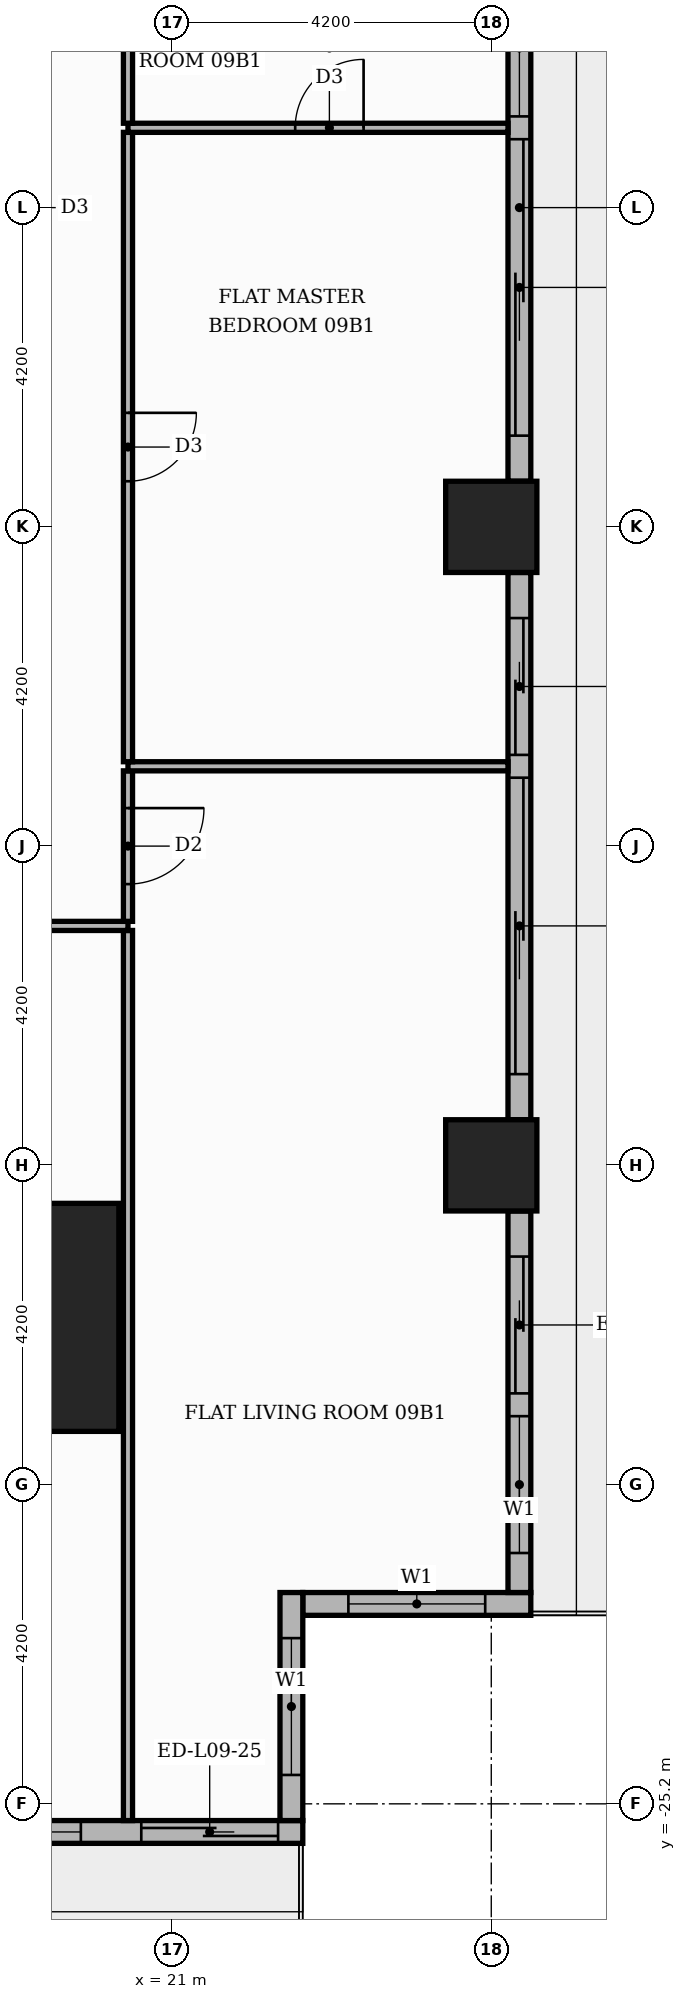
"""IFC4 building model, lengths in metres.
Left out: names, types, materials, properties, quantities, classifications, styles, units other than length and angle.
Written with IfcOpenShell. Run it as: python <this file> out.ifc"""

import sys

from ifc_helpers import new_model, si_unit, direction, frame, frame_2d, origin, origin_2d, place, context, subcontext, project, spatial, rectangle, extrude, element, fill, save


model = new_model("IFC4")
c1 = context("Model", 3, precision=1e-05, world=origin(), true_north=direction((0.0, 1.0)))
c2 = subcontext(c1, "Body", "Model", "MODEL_VIEW")
j1 = project(units=[si_unit("LENGTHUNIT", "METRE"), si_unit("PLANEANGLEUNIT", "RADIAN")], contexts=[c1])
p1 = place(None, origin())
s1 = spatial("IfcSite", under=j1, at=p1, CompositionType="ELEMENT")
p2 = place(p1, origin())
s2 = spatial("IfcBuilding", under=s1, at=p2, CompositionType="ELEMENT")
p3 = place(p2, frame((0.0, 0.0, 42.6)))
s3 = spatial("IfcBuildingStorey", under=s2, at=p3, CompositionType="ELEMENT", Elevation=42.6)
p4 = place(p3, frame((18.8, -18.8, 0.0), z_axis=(0.0, 0.0, 1.0), x_axis=(1.0, 0.0, 0.0)))
e1 = element("IfcColumn", 1, at=p4, inside=s3, PredefinedType="COLUMN", context=c2, shape_type="SweptSolid", body=[
    extrude(rectangle(XDim=3.0, YDim=3.0, at=origin_2d()), origin(), (0.0, 0.0, 1.0), 3.9),
])
for number, where, z_axis, x_axis in (
    (2, (25.2, -8.4, 0.0), (0.0, 0.0, 1.0), (1.0, 0.0, 0.0)),
    (3, (25.2, -16.8, 0.0), (0.0, 0.0, 1.0), (1.0, 0.0, 0.0)),
):
    element("IfcColumn", number, at=place(p3, frame(where, z_axis=z_axis, x_axis=x_axis)), inside=s3, PredefinedType="COLUMN", context=c2, shape_type="SweptSolid", body=[
        extrude(rectangle(XDim=1.2, YDim=1.2, at=origin_2d()), origin(), (0.0, 0.0, 1.0), 3.9),
    ])
p5 = place(p3, frame((22.72, -22.57, 0.0), z_axis=(0.0, 0.0, 1.0), x_axis=(1.0, 0.0, 0.0)))
e4 = element("IfcWall", 4, at=p5, inside=s3, PredefinedType="STANDARD", context=c2, shape_type="SweptSolid", body=[
    extrude(rectangle(XDim=3.0, YDim=0.3, at=frame_2d((1.5, 0.0))), origin(), (0.0, 0.0, 1.0), 3.48),
])
p6 = place(p5, frame((0.6, 0.0, 0.9)))
e5 = element("IfcOpeningElement", 5, at=p6, cuts=e4, PredefinedType="OPENING", context=c2, shape_type="SweptSolid", body=[
    extrude(rectangle(XDim=1.8, YDim=2.1, at=frame_2d((0.9, 1.05))), frame((0.0, 0.16, 0.0), z_axis=(0.0, -1.0, 0.0), x_axis=(1.0, 0.0, 0.0)), (0.0, 0.0, 1.0), 0.32),
])
p7 = place(p3, frame((25.57, -22.42, 0.0), z_axis=(0.0, 0.0, 1.0), x_axis=(0.0, 1.0, 0.0)))
e6 = element("IfcWall", 6, at=p7, inside=s3, PredefinedType="STANDARD", context=c2, shape_type="SweptSolid", body=[
    extrude(rectangle(XDim=5.02, YDim=0.3, at=frame_2d((2.51, 0.0))), origin(), (0.0, 0.0, 1.0), 3.48),
])
p8 = place(p7, frame((0.52, 0.0, 0.9)))
e7 = element("IfcOpeningElement", 7, at=p8, cuts=e6, PredefinedType="OPENING", context=c2, shape_type="SweptSolid", body=[
    extrude(rectangle(XDim=1.8, YDim=2.1, at=frame_2d((0.9, 1.05))), frame((0.0, 0.16, 0.0), z_axis=(0.0, -1.0, 0.0), x_axis=(1.0, 0.0, 0.0)), (0.0, 0.0, 1.0), 0.32),
])
p9 = place(p7, frame((2.62, 0.0, 0.0)))
e8 = element("IfcOpeningElement", 8, at=p9, cuts=e6, PredefinedType="OPENING", context=c2, shape_type="SweptSolid", body=[
    extrude(rectangle(XDim=1.8, YDim=2.4, at=frame_2d((0.9, 1.2))), frame((0.0, 0.16, 0.0), z_axis=(0.0, -1.0, 0.0), x_axis=(1.0, 0.0, 0.0)), (0.0, 0.0, 1.0), 0.32),
])
p10 = place(p3, frame((25.57, -16.2, 0.0), z_axis=(0.0, 0.0, 1.0), x_axis=(0.0, 1.0, 0.0)))
e9 = element("IfcWall", 9, at=p10, inside=s3, PredefinedType="STANDARD", context=c2, shape_type="SweptSolid", body=[
    extrude(rectangle(XDim=7.2, YDim=0.3, at=frame_2d((3.6, 0.0))), origin(), (0.0, 0.0, 1.0), 3.48),
])
p11 = place(p10, frame((0.6, 0.0, 0.0)))
e10 = element("IfcOpeningElement", 10, at=p11, cuts=e9, PredefinedType="OPENING", context=c2, shape_type="SweptSolid", body=[
    extrude(rectangle(XDim=3.9, YDim=2.4, at=frame_2d((1.95, 1.2))), frame((0.0, 0.16, 0.0), z_axis=(0.0, -1.0, 0.0), x_axis=(1.0, 0.0, 0.0)), (0.0, 0.0, 1.0), 0.32),
])
p12 = place(p10, frame((4.8, 0.0, 0.0)))
e11 = element("IfcOpeningElement", 11, at=p12, cuts=e9, PredefinedType="OPENING", context=c2, shape_type="SweptSolid", body=[
    extrude(rectangle(XDim=1.8, YDim=2.4, at=frame_2d((0.9, 1.2))), frame((0.0, 0.16, 0.0), z_axis=(0.0, -1.0, 0.0), x_axis=(1.0, 0.0, 0.0)), (0.0, 0.0, 1.0), 0.32),
])
p13 = place(p3, frame((25.57, -7.8, 0.0), z_axis=(0.0, 0.0, 1.0), x_axis=(0.0, 1.0, 0.0)))
e12 = element("IfcWall", 12, at=p13, inside=s3, PredefinedType="STANDARD", context=c2, shape_type="SweptSolid", body=[
    extrude(rectangle(XDim=7.2, YDim=0.3, at=frame_2d((3.6, 0.0))), origin(), (0.0, 0.0, 1.0), 3.48),
])
p14 = place(p13, frame((0.6, 0.0, 0.0)))
e13 = element("IfcOpeningElement", 13, at=p14, cuts=e12, PredefinedType="OPENING", context=c2, shape_type="SweptSolid", body=[
    extrude(rectangle(XDim=3.9, YDim=2.4, at=frame_2d((1.95, 1.2))), frame((0.0, 0.16, 0.0), z_axis=(0.0, -1.0, 0.0), x_axis=(1.0, 0.0, 0.0)), (0.0, 0.0, 1.0), 0.32),
])
p15 = place(p13, frame((4.8, 0.0, 0.9)))
e14 = element("IfcOpeningElement", 14, at=p15, cuts=e12, PredefinedType="OPENING", context=c2, shape_type="SweptSolid", body=[
    extrude(rectangle(XDim=1.8, YDim=2.1, at=frame_2d((0.9, 1.05))), frame((0.0, 0.16, 0.0), z_axis=(0.0, -1.0, 0.0), x_axis=(1.0, 0.0, 0.0)), (0.0, 0.0, 1.0), 0.32),
])
p16 = place(p3, frame((17.4, -25.57, 0.0), z_axis=(0.0, 0.0, 1.0), x_axis=(1.0, 0.0, 0.0)))
e15 = element("IfcWall", 15, at=p16, inside=s3, PredefinedType="STANDARD", context=c2, shape_type="SweptSolid", body=[
    extrude(rectangle(XDim=5.32, YDim=0.3, at=frame_2d((2.66, 0.0))), origin(), (0.0, 0.0, 1.0), 3.48),
])
p17 = place(p16, frame((0.6, 0.0, 0.9)))
e16 = element("IfcOpeningElement", 16, at=p17, cuts=e15, PredefinedType="OPENING", context=c2, shape_type="SweptSolid", body=[
    extrude(rectangle(XDim=1.8, YDim=2.1, at=frame_2d((0.9, 1.05))), frame((0.0, 0.16, 0.0), z_axis=(0.0, -1.0, 0.0), x_axis=(1.0, 0.0, 0.0)), (0.0, 0.0, 1.0), 0.32),
])
p18 = place(p16, frame((3.195, 0.0, 0.0)))
e17 = element("IfcOpeningElement", 17, at=p18, cuts=e15, PredefinedType="OPENING", context=c2, shape_type="SweptSolid", body=[
    extrude(rectangle(XDim=1.8, YDim=2.4, at=frame_2d((0.9, 1.2))), frame((0.0, 0.16, 0.0), z_axis=(0.0, -1.0, 0.0), x_axis=(1.0, 0.0, 0.0)), (0.0, 0.0, 1.0), 0.32),
])
p19 = place(p3, frame((22.57, -25.42, 0.0), z_axis=(0.0, 0.0, 1.0), x_axis=(0.0, 1.0, 0.0)))
e18 = element("IfcWall", 18, at=p19, inside=s3, PredefinedType="STANDARD", context=c2, shape_type="SweptSolid", body=[
    extrude(rectangle(XDim=3.0, YDim=0.3, at=frame_2d((1.5, 0.0))), origin(), (0.0, 0.0, 1.0), 3.48),
])
p20 = place(p19, frame((0.6, 0.0, 0.9)))
e19 = element("IfcOpeningElement", 19, at=p20, cuts=e18, PredefinedType="OPENING", context=c2, shape_type="SweptSolid", body=[
    extrude(rectangle(XDim=1.8, YDim=2.1, at=frame_2d((0.9, 1.05))), frame((0.0, 0.16, 0.0), z_axis=(0.0, -1.0, 0.0), x_axis=(1.0, 0.0, 0.0)), (0.0, 0.0, 1.0), 0.32),
])
p21 = place(p3, frame((20.42, -25.42, 0.0), z_axis=(0.0, 0.0, 1.0), x_axis=(0.0, 1.0, 0.0)))
e20 = element("IfcWall", 20, at=p21, inside=s3, PredefinedType="PARTITIONING", context=c2, shape_type="SweptSolid", body=[
    extrude(rectangle(XDim=11.71, YDim=0.12, at=frame_2d((5.855, 0.0))), origin(), (0.0, 0.0, 1.0), 3.48),
])
p22 = place(p3, frame((13.65, -13.65, 0.0), z_axis=(0.0, 0.0, 1.0), x_axis=(1.0, 0.0, 0.0)))
e21 = element("IfcWall", 21, at=p22, inside=s3, PredefinedType="PARTITIONING", context=c2, shape_type="SweptSolid", body=[
    extrude(rectangle(XDim=6.77, YDim=0.12, at=frame_2d((3.385, 0.0))), origin(), (0.0, 0.0, 1.0), 3.48),
])
p23 = place(p22, frame((2.885, 0.0, 0.0)))
e22 = element("IfcOpeningElement", 22, at=p23, cuts=e21, PredefinedType="OPENING", context=c2, shape_type="SweptSolid", body=[
    extrude(rectangle(XDim=1.0, YDim=2.1, at=frame_2d((0.5, 1.05))), frame((0.0, 0.07, 0.0), z_axis=(0.0, -1.0, 0.0), x_axis=(1.0, 0.0, 0.0)), (0.0, 0.0, 1.0), 0.14),
])
p24 = place(p3, frame((20.42, -13.59, 0.0), z_axis=(0.0, 0.0, 1.0), x_axis=(0.0, 1.0, 0.0)))
e23 = element("IfcWall", 23, at=p24, inside=s3, PredefinedType="PARTITIONING", context=c2, shape_type="SweptSolid", body=[
    extrude(rectangle(XDim=1.98, YDim=0.12, at=frame_2d((0.99, 0.0))), origin(), (0.0, 0.0, 1.0), 3.48),
])
p25 = place(p24, frame((0.49, 0.0, 0.0)))
e24 = element("IfcOpeningElement", 24, at=p25, cuts=e23, PredefinedType="OPENING", context=c2, shape_type="SweptSolid", body=[
    extrude(rectangle(XDim=1.0, YDim=2.1, at=frame_2d((0.5, 1.05))), frame((0.0, 0.07, 0.0), z_axis=(0.0, -1.0, 0.0), x_axis=(1.0, 0.0, 0.0)), (0.0, 0.0, 1.0), 0.14),
])
p26 = place(p3, frame((20.42, -11.55, 0.0), z_axis=(0.0, 0.0, 1.0), x_axis=(1.0, 0.0, 0.0)))
e25 = element("IfcWall", 25, at=p26, inside=s3, PredefinedType="PARTITIONING", context=c2, shape_type="SweptSolid", body=[
    extrude(rectangle(XDim=5.0, YDim=0.12, at=frame_2d((2.5, 0.0))), origin(), (0.0, 0.0, 1.0), 3.48),
])
p27 = place(p3, frame((20.42, -11.49, 0.0), z_axis=(0.0, 0.0, 1.0), x_axis=(0.0, 1.0, 0.0)))
e26 = element("IfcWall", 26, at=p27, inside=s3, PredefinedType="PARTITIONING", context=c2, shape_type="SweptSolid", body=[
    extrude(rectangle(XDim=8.28, YDim=0.12, at=frame_2d((4.14, 0.0))), origin(), (0.0, 0.0, 1.0), 3.48),
])
p28 = place(p27, frame((3.69, 0.0, 0.0)))
e27 = element("IfcOpeningElement", 27, at=p28, cuts=e26, PredefinedType="OPENING", context=c2, shape_type="SweptSolid", body=[
    extrude(rectangle(XDim=0.9, YDim=2.1, at=frame_2d((0.45, 1.05))), frame((0.0, 0.07, 0.0), z_axis=(0.0, -1.0, 0.0), x_axis=(1.0, 0.0, 0.0)), (0.0, 0.0, 1.0), 0.14),
])
p29 = place(p3, frame((20.42, -3.15, 0.0), z_axis=(0.0, 0.0, 1.0), x_axis=(1.0, 0.0, 0.0)))
e28 = element("IfcWall", 28, at=p29, inside=s3, PredefinedType="PARTITIONING", context=c2, shape_type="SweptSolid", body=[
    extrude(rectangle(XDim=5.0, YDim=0.12, at=frame_2d((2.5, 0.0))), origin(), (0.0, 0.0, 1.0), 3.48),
])
p30 = place(p29, frame((2.2, 0.0, 0.0)))
e29 = element("IfcOpeningElement", 29, at=p30, cuts=e28, PredefinedType="OPENING", context=c2, shape_type="SweptSolid", body=[
    extrude(rectangle(XDim=0.9, YDim=2.1, at=frame_2d((0.45, 1.05))), frame((0.0, 0.07, 0.0), z_axis=(0.0, -1.0, 0.0), x_axis=(1.0, 0.0, 0.0)), (0.0, 0.0, 1.0), 0.14),
])
p31 = place(p3, frame((20.42, -3.09, 0.0), z_axis=(0.0, 0.0, 1.0), x_axis=(0.0, 1.0, 0.0)))
e30 = element("IfcWall", 30, at=p31, inside=s3, PredefinedType="PARTITIONING", context=c2, shape_type="SweptSolid", body=[
    extrude(rectangle(XDim=1.98, YDim=0.12, at=frame_2d((0.99, 0.0))), origin(), (0.0, 0.0, 1.0), 3.48),
])
p32 = place(p6, origin())
e31 = element("IfcWindow", 31, at=p32, inside=s3, PartitioningType="SINGLE_PANEL", PredefinedType="WINDOW", context=c2, shape_type="SweptSolid", body=[
    extrude(rectangle(XDim=1.8, YDim=2.1, at=frame_2d((0.9, 1.05))), frame((0.0, 0.03, 0.0), z_axis=(0.0, -1.0, 0.0), x_axis=(1.0, 0.0, 0.0)), (0.0, 0.0, 1.0), 0.06),
])
fill(e5, e31)
p33 = place(p8, origin())
e32 = element("IfcWindow", 32, at=p33, inside=s3, PartitioningType="SINGLE_PANEL", PredefinedType="WINDOW", context=c2, shape_type="SweptSolid", body=[
    extrude(rectangle(XDim=1.8, YDim=2.1, at=frame_2d((0.9, 1.05))), frame((0.0, 0.03, 0.0), z_axis=(0.0, -1.0, 0.0), x_axis=(1.0, 0.0, 0.0)), (0.0, 0.0, 1.0), 0.06),
])
fill(e7, e32)
p34 = place(p9, origin())
e33 = element("IfcDoor", 33, at=p34, inside=s3, OperationType="SLIDING_TO_RIGHT", PredefinedType="DOOR", context=c2, shape_type="SweptSolid", body=[
    extrude(rectangle(XDim=1.8, YDim=2.4, at=frame_2d((0.9, 1.2))), frame((0.0, 0.025, 0.0), z_axis=(0.0, -1.0, 0.0), x_axis=(1.0, 0.0, 0.0)), (0.0, 0.0, 1.0), 0.05),
])
fill(e8, e33)
p35 = place(p11, origin())
e34 = element("IfcDoor", 34, at=p35, inside=s3, OperationType="SLIDING_TO_LEFT", PredefinedType="DOOR", context=c2, shape_type="SweptSolid", body=[
    extrude(rectangle(XDim=3.9, YDim=2.4, at=frame_2d((1.95, 1.2))), frame((0.0, 0.025, 0.0), z_axis=(0.0, -1.0, 0.0), x_axis=(1.0, 0.0, 0.0)), (0.0, 0.0, 1.0), 0.05),
])
fill(e10, e34)
p36 = place(p12, origin())
e35 = element("IfcDoor", 35, at=p36, inside=s3, OperationType="SLIDING_TO_RIGHT", PredefinedType="DOOR", context=c2, shape_type="SweptSolid", body=[
    extrude(rectangle(XDim=1.8, YDim=2.4, at=frame_2d((0.9, 1.2))), frame((0.0, 0.025, 0.0), z_axis=(0.0, -1.0, 0.0), x_axis=(1.0, 0.0, 0.0)), (0.0, 0.0, 1.0), 0.05),
])
fill(e11, e35)
p37 = place(p14, origin())
e36 = element("IfcDoor", 36, at=p37, inside=s3, OperationType="SLIDING_TO_LEFT", PredefinedType="DOOR", context=c2, shape_type="SweptSolid", body=[
    extrude(rectangle(XDim=3.9, YDim=2.4, at=frame_2d((1.95, 1.2))), frame((0.0, 0.025, 0.0), z_axis=(0.0, -1.0, 0.0), x_axis=(1.0, 0.0, 0.0)), (0.0, 0.0, 1.0), 0.05),
])
fill(e13, e36)
p38 = place(p15, origin())
e37 = element("IfcWindow", 37, at=p38, inside=s3, PartitioningType="SINGLE_PANEL", PredefinedType="WINDOW", context=c2, shape_type="SweptSolid", body=[
    extrude(rectangle(XDim=1.8, YDim=2.1, at=frame_2d((0.9, 1.05))), frame((0.0, 0.03, 0.0), z_axis=(0.0, -1.0, 0.0), x_axis=(1.0, 0.0, 0.0)), (0.0, 0.0, 1.0), 0.06),
])
fill(e14, e37)
p39 = place(p17, origin())
e38 = element("IfcWindow", 38, at=p39, inside=s3, PartitioningType="SINGLE_PANEL", PredefinedType="WINDOW", context=c2, shape_type="SweptSolid", body=[
    extrude(rectangle(XDim=1.8, YDim=2.1, at=frame_2d((0.9, 1.05))), frame((0.0, 0.03, 0.0), z_axis=(0.0, -1.0, 0.0), x_axis=(1.0, 0.0, 0.0)), (0.0, 0.0, 1.0), 0.06),
])
fill(e16, e38)
p40 = place(p18, origin())
e39 = element("IfcDoor", 39, at=p40, inside=s3, OperationType="SLIDING_TO_RIGHT", PredefinedType="DOOR", context=c2, shape_type="SweptSolid", body=[
    extrude(rectangle(XDim=1.8, YDim=2.4, at=frame_2d((0.9, 1.2))), frame((0.0, 0.025, 0.0), z_axis=(0.0, -1.0, 0.0), x_axis=(1.0, 0.0, 0.0)), (0.0, 0.0, 1.0), 0.05),
])
fill(e17, e39)
p41 = place(p20, origin())
e40 = element("IfcWindow", 40, at=p41, inside=s3, PartitioningType="SINGLE_PANEL", PredefinedType="WINDOW", context=c2, shape_type="SweptSolid", body=[
    extrude(rectangle(XDim=1.8, YDim=2.1, at=frame_2d((0.9, 1.05))), frame((0.0, 0.03, 0.0), z_axis=(0.0, -1.0, 0.0), x_axis=(1.0, 0.0, 0.0)), (0.0, 0.0, 1.0), 0.06),
])
fill(e19, e40)
p42 = place(p25, frame((1.0, 0.0, 0.0), z_axis=(0.0, 0.0, 1.0), x_axis=(-1.0, 0.0, 0.0)))
e41 = element("IfcDoor", 41, at=p42, inside=s3, OperationType="SINGLE_SWING_RIGHT", PredefinedType="DOOR", context=c2, shape_type="SweptSolid", body=[
    extrude(rectangle(XDim=1.0, YDim=2.1, at=frame_2d((0.5, 1.05))), frame((0.0, 0.025, 0.0), z_axis=(0.0, -1.0, 0.0), x_axis=(1.0, 0.0, 0.0)), (0.0, 0.0, 1.0), 0.05),
])
fill(e24, e41)
p43 = place(p28, frame((0.9, 0.0, 0.0), z_axis=(0.0, 0.0, 1.0), x_axis=(-1.0, 0.0, 0.0)))
e42 = element("IfcDoor", 42, at=p43, inside=s3, OperationType="SINGLE_SWING_RIGHT", PredefinedType="DOOR", context=c2, shape_type="SweptSolid", body=[
    extrude(rectangle(XDim=0.9, YDim=2.1, at=frame_2d((0.45, 1.05))), frame((0.0, 0.025, 0.0), z_axis=(0.0, -1.0, 0.0), x_axis=(1.0, 0.0, 0.0)), (0.0, 0.0, 1.0), 0.05),
])
fill(e27, e42)
p44 = place(p30, origin())
e43 = element("IfcDoor", 43, at=p44, inside=s3, OperationType="SINGLE_SWING_RIGHT", PredefinedType="DOOR", context=c2, shape_type="SweptSolid", body=[
    extrude(rectangle(XDim=0.9, YDim=2.1, at=frame_2d((0.45, 1.05))), frame((0.0, 0.025, 0.0), z_axis=(0.0, -1.0, 0.0), x_axis=(1.0, 0.0, 0.0)), (0.0, 0.0, 1.0), 0.05),
])
fill(e29, e43)
save(model, sys.argv[1])
